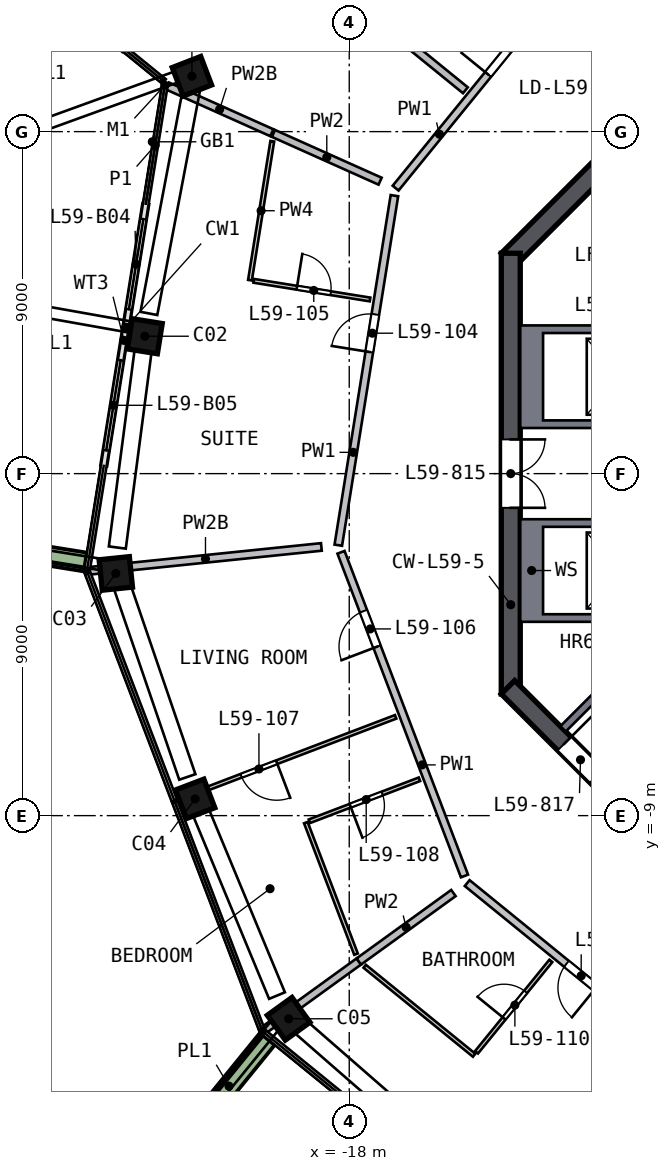
"""IFC4 building model, lengths in metres.
Left out: names, types, materials, properties, quantities, classifications, styles, units other than length and angle.
Written with IfcOpenShell. Run it as: python <this file> out.ifc"""

import sys

from ifc_helpers import new_model, si_unit, direction, frame, frame_2d, origin, origin_2d, place, context, subcontext, project, spatial, polyline, rectangle, outline, extrude, element, fill, save


model = new_model("IFC4")
c1 = context("Model", 3, precision=1e-05, world=origin(), true_north=direction((0.0, 1.0)))
c2 = subcontext(c1, "Body", "Model", "MODEL_VIEW")
j1 = project(units=[si_unit("LENGTHUNIT", "METRE"), si_unit("PLANEANGLEUNIT", "RADIAN")], contexts=[c1])
p1 = place(None, origin())
s1 = spatial("IfcSite", under=j1, at=p1, CompositionType="ELEMENT")
p2 = place(p1, origin())
s2 = spatial("IfcBuilding", under=s1, at=p2, CompositionType="ELEMENT")
p3 = place(p2, frame((0.0, 0.0, 241.0)))
s3 = spatial("IfcBuildingStorey", under=s2, at=p3, CompositionType="ELEMENT", Elevation=241.0)
p4 = place(p3, frame((-22.08, 10.584, 0.0), z_axis=(-0.0494849, -0.105430961, 0.993194622), x_axis=(-0.361383921, 0.928926692, 0.080603122)))
e1 = element("IfcColumn", 1, at=p4, inside=s3, PredefinedType="COLUMN", context=c2, shape_type="SweptSolid", body=[
    extrude(rectangle(XDim=0.8, YDim=0.8, at=origin_2d()), origin(), (0.0, 0.0, 1.0), 3.212),
])
p5 = place(p3, frame((-23.359, 3.75, 0.0), z_axis=(-0.016882596, -0.111333877, 0.993639646), x_axis=(-0.157302824, -0.981109815, -0.112602632)))
e2 = element("IfcColumn", 2, at=p5, inside=s3, PredefinedType="COLUMN", context=c2, shape_type="SweptSolid", body=[
    extrude(rectangle(XDim=0.8, YDim=0.8, at=origin_2d()), origin(), (0.0, 0.0, 1.0), 3.21),
])
p6 = place(p3, frame((-24.158, -2.488, 0.0), z_axis=(0.012847755, -0.114793547, 0.993306285), x_axis=(-0.10209663, 0.988045851, 0.115506166)))
e3 = element("IfcColumn", 3, at=p6, inside=s3, PredefinedType="COLUMN", context=c2, shape_type="SweptSolid", body=[
    extrude(rectangle(XDim=0.8, YDim=0.8, at=origin_2d()), origin(), (0.0, 0.0, 1.0), 3.211),
])
p7 = place(p3, frame((-22.105, -8.432, 0.0), z_axis=(0.040990103, -0.104794735, 0.993648768), x_axis=(0.354093219, -0.928416268, -0.112522108)))
e4 = element("IfcColumn", 4, at=p7, inside=s3, PredefinedType="COLUMN", context=c2, shape_type="SweptSolid", body=[
    extrude(rectangle(XDim=0.8, YDim=0.8, at=origin_2d()), origin(), (0.0, 0.0, 1.0), 3.21),
])
p8 = place(p3, frame((-19.677, -14.234, 0.0), z_axis=(0.068496241, -0.092975475, 0.993309532), x_axis=(-0.582352668, 0.804692577, 0.115478247)))
e5 = element("IfcColumn", 5, at=p8, inside=s3, PredefinedType="COLUMN", context=c2, shape_type="SweptSolid", body=[
    extrude(rectangle(XDim=0.8, YDim=0.8, at=origin_2d()), origin(), (0.0, 0.0, 1.0), 3.211),
])
p9 = place(p3, frame((-5.622, 13.823, 0.0), z_axis=(0.0, 0.0, 1.0), x_axis=(-0.707106781, -0.707106781, 0.0)))
e6 = element("IfcWall", 6, at=p9, inside=s3, PredefinedType="SHEAR", context=c2, shape_type="SweptSolid", body=[
    extrude(rectangle(XDim=11.598, YDim=0.5, at=frame_2d((5.799, 0.0))), origin(), (0.0, 0.0, 1.0), 3.5),
])
p10 = place(p3, frame((-13.75, 5.799, 0.0), z_axis=(0.0, 0.0, 1.0), x_axis=(0.0, -1.0, 0.0)))
e7 = element("IfcWall", 7, at=p10, inside=s3, PredefinedType="SHEAR", context=c2, shape_type="SweptSolid", body=[
    extrude(rectangle(XDim=11.598, YDim=0.5, at=frame_2d((5.799, 0.0))), origin(), (0.0, 0.0, 1.0), 3.5),
])
p11 = place(p10, frame((4.899, 0.0, 0.0)))
e8 = element("IfcOpeningElement", 8, at=p11, cuts=e7, PredefinedType="OPENING", context=c2, shape_type="SweptSolid", body=[
    extrude(rectangle(XDim=1.8, YDim=2.1, at=frame_2d((0.9, 1.05))), frame((0.0, 0.26, 0.0), z_axis=(0.0, -1.0, 0.0), x_axis=(1.0, 0.0, 0.0)), (0.0, 0.0, 1.0), 0.52),
])
p12 = place(p3, frame((-13.823, -5.622, 0.0), z_axis=(0.0, 0.0, 1.0), x_axis=(0.707106781, -0.707106781, 0.0)))
e9 = element("IfcWall", 9, at=p12, inside=s3, PredefinedType="SHEAR", context=c2, shape_type="SweptSolid", body=[
    extrude(rectangle(XDim=11.598, YDim=0.5, at=frame_2d((5.799, 0.0))), origin(), (0.0, 0.0, 1.0), 3.5),
])
p13 = place(p12, frame((2.099, 0.0, 0.0)))
e10 = element("IfcOpeningElement", 10, at=p13, cuts=e9, PredefinedType="OPENING", context=c2, shape_type="SweptSolid", body=[
    extrude(rectangle(XDim=1.2, YDim=2.1, at=frame_2d((0.6, 1.05))), frame((0.0, 0.26, 0.0), z_axis=(0.0, -1.0, 0.0), x_axis=(1.0, 0.0, 0.0)), (0.0, 0.0, 1.0), 0.52),
])
p14 = place(p3, frame((-23.354, 7.091, 0.0), z_axis=(0.0, 0.0, 1.0), x_axis=(-0.158541584, -0.987352301, 0.0)))
e11 = element("IfcWall", 11, at=p14, inside=s3, PredefinedType="SOLIDWALL", context=c2, shape_type="SweptSolid", body=[
    extrude(rectangle(XDim=3.3, YDim=0.15, at=frame_2d((1.65, 0.0))), origin(), (0.0, 0.0, 1.0), 2.525),
])
p15 = place(p14, frame((0.4, 0.0, 0.0)))
e12 = element("IfcOpeningElement", 12, at=p15, cuts=e11, PredefinedType="OPENING", context=c2, shape_type="SweptSolid", body=[
    extrude(rectangle(XDim=2.4, YDim=2.4, at=frame_2d((1.2, 1.2))), frame((0.0, 0.085, 0.0), z_axis=(0.0, -1.0, 0.0), x_axis=(1.0, 0.0, 0.0)), (0.0, 0.0, 1.0), 0.17),
])
p16 = place(p3, frame((-23.878, 3.833, 0.0), z_axis=(0.0, 0.0, 1.0), x_axis=(-0.158502817, -0.987358525, 0.0)))
e13 = element("IfcWall", 13, at=p16, inside=s3, PredefinedType="SOLIDWALL", context=c2, shape_type="SweptSolid", body=[
    extrude(rectangle(XDim=3.661, YDim=0.15, at=frame_2d((1.831, 0.0))), origin(), (0.0, 0.0, 1.0), 2.525),
])
p17 = place(p16, frame((0.861, 0.0, 0.0)))
e14 = element("IfcOpeningElement", 14, at=p17, cuts=e13, PredefinedType="OPENING", context=c2, shape_type="SweptSolid", body=[
    extrude(rectangle(XDim=2.4, YDim=2.4, at=frame_2d((1.2, 1.2))), frame((0.0, 0.085, 0.0), z_axis=(0.0, -1.0, 0.0), x_axis=(1.0, 0.0, 0.0)), (0.0, 0.0, 1.0), 0.17),
])
p18 = place(p3, frame((-25.732, 12.548, 0.0), z_axis=(0.0, 0.0, 1.0), x_axis=(-0.630920107, -0.775847806, 0.0)))
e15 = element("IfcWall", 15, at=p18, inside=s3, PredefinedType="SOLIDWALL", context=c2, shape_type="SweptSolid", body=[
    extrude(rectangle(XDim=3.199, YDim=0.5, at=frame_2d((1.6, 0.0))), origin(), (0.0, 0.0, 1.0), 0.7),
])
p19 = place(p3, frame((-27.608, -1.898, 0.0), z_axis=(0.0, 0.0, 1.0), x_axis=(0.987347321, -0.158572593, 0.0)))
e16 = element("IfcWall", 16, at=p19, inside=s3, PredefinedType="SOLIDWALL", context=c2, shape_type="SweptSolid", body=[
    extrude(rectangle(XDim=2.699, YDim=0.5, at=frame_2d((1.35, 0.0))), origin(), (0.0, 0.0, 1.0), 0.7),
])
p20 = place(p3, frame((-20.155, -14.878, 0.0), z_axis=(0.0, 0.0, 1.0), x_axis=(-0.630957466, -0.775817424, 0.0)))
e17 = element("IfcWall", 17, at=p20, inside=s3, PredefinedType="SOLIDWALL", context=c2, shape_type="SweptSolid", body=[
    extrude(rectangle(XDim=3.199, YDim=0.5, at=frame_2d((1.599, 0.0))), origin(), (0.0, 0.0, 1.0), 0.7),
])
p21 = place(p3, origin())
e18 = element("IfcWall", 18, at=p21, inside=s3, PredefinedType="SOLIDWALL", context=c2, shape_type="SweptSolid", body=[
    extrude(outline(polyline([(-13.5, 3.9), (-9.9, 3.9), (-9.9, 3.7), (-12.9, 3.7), (-12.9, 1.4), (-9.9, 1.4), (-9.9, 1.2), (-13.5, 1.2), (-13.5, 3.9)])), origin(), (0.0, 0.0, 1.0), 3.19),
])
p22 = place(p3, origin())
e19 = element("IfcWall", 19, at=p22, inside=s3, PredefinedType="SOLIDWALL", context=c2, shape_type="SweptSolid", body=[
    extrude(outline(polyline([(-13.5, -3.9), (-13.5, -1.2), (-9.9, -1.2), (-9.9, -1.4), (-12.9, -1.4), (-12.9, -3.7), (-9.9, -3.7), (-9.9, -3.9), (-13.5, -3.9)])), origin(), (0.0, 0.0, 1.0), 3.19),
])
p23 = place(p3, frame((-9.334, -3.677, 0.0), z_axis=(0.0, 0.0, 1.0), x_axis=(-0.707135168, -0.707078393, 0.0)))
e20 = element("IfcWall", 20, at=p23, inside=s3, PredefinedType="SOLIDWALL", context=c2, shape_type="SweptSolid", body=[
    extrude(rectangle(XDim=4.3, YDim=0.2, at=frame_2d((2.15, 0.0))), origin(), (0.0, 0.0, 1.0), 3.19),
])
p24 = place(p3, frame((-18.288, -1.883, 0.0), z_axis=(0.0, 0.0, 1.0), x_axis=(0.158514786, 0.987356604, 0.0)))
e21 = element("IfcWall", 21, at=p24, inside=s3, PredefinedType="SOLIDWALL", context=c2, shape_type="SweptSolid", body=[
    extrude(rectangle(XDim=9.316, YDim=0.2, at=frame_2d((4.658, 0.0))), origin(), (0.0, 0.0, 1.0), 3.19),
])
p25 = place(p24, frame((5.15, 0.0, 0.0)))
e22 = element("IfcOpeningElement", 22, at=p25, cuts=e21, PredefinedType="OPENING", context=c2, shape_type="SweptSolid", body=[
    extrude(rectangle(XDim=1.0, YDim=2.1, at=frame_2d((0.5, 1.05))), frame((0.0, 0.11, 0.0), z_axis=(0.0, -1.0, 0.0), x_axis=(1.0, 0.0, 0.0)), (0.0, 0.0, 1.0), 0.22),
])
p26 = place(p3, frame((-14.968, -10.588, 0.0), z_axis=(0.0, 0.0, 1.0), x_axis=(-0.35640621, 0.934331105, 0.0)))
e23 = element("IfcWall", 23, at=p26, inside=s3, PredefinedType="SOLIDWALL", context=c2, shape_type="SweptSolid", body=[
    extrude(rectangle(XDim=9.117, YDim=0.2, at=frame_2d((4.558, 0.0))), origin(), (0.0, 0.0, 1.0), 3.19),
])
p27 = place(p26, frame((6.458, 0.0, 0.0)))
e24 = element("IfcOpeningElement", 24, at=p27, cuts=e23, PredefinedType="OPENING", context=c2, shape_type="SweptSolid", body=[
    extrude(rectangle(XDim=1.0, YDim=2.1, at=frame_2d((0.5, 1.05))), frame((0.0, 0.11, 0.0), z_axis=(0.0, -1.0, 0.0), x_axis=(1.0, 0.0, 0.0)), (0.0, 0.0, 1.0), 0.22),
])
p28 = place(p3, frame((-16.78, 7.513, 0.0), z_axis=(0.0, 0.0, 1.0), x_axis=(0.630941799, 0.775830166, 0.0)))
e25 = element("IfcWall", 25, at=p28, inside=s3, PredefinedType="SOLIDWALL", context=c2, shape_type="SweptSolid", body=[
    extrude(rectangle(XDim=9.316, YDim=0.2, at=frame_2d((4.658, 0.0))), origin(), (0.0, 0.0, 1.0), 3.19),
])
p29 = place(p28, frame((3.856, 0.0, 0.0)))
e26 = element("IfcOpeningElement", 26, at=p29, cuts=e25, PredefinedType="OPENING", context=c2, shape_type="SweptSolid", body=[
    extrude(rectangle(XDim=1.8, YDim=2.1, at=frame_2d((0.9, 1.05))), frame((0.0, 0.11, 0.0), z_axis=(0.0, -1.0, 0.0), x_axis=(1.0, 0.0, 0.0)), (0.0, 0.0, 1.0), 0.22),
])
p30 = place(p3, frame((-7.513, -16.78, 0.0), z_axis=(0.0, 0.0, 1.0), x_axis=(-0.775832995, 0.63093832, 0.0)))
e27 = element("IfcWall", 27, at=p30, inside=s3, PredefinedType="SOLIDWALL", context=c2, shape_type="SweptSolid", body=[
    extrude(rectangle(XDim=9.517, YDim=0.2, at=frame_2d((4.758, 0.0))), origin(), (0.0, 0.0, 1.0), 3.19),
])
p31 = place(p30, frame((5.15, 0.0, 0.0)))
e28 = element("IfcOpeningElement", 28, at=p31, cuts=e27, PredefinedType="OPENING", context=c2, shape_type="SweptSolid", body=[
    extrude(rectangle(XDim=1.0, YDim=2.1, at=frame_2d((0.5, 1.05))), frame((0.0, 0.11, 0.0), z_axis=(0.0, -1.0, 0.0), x_axis=(1.0, 0.0, 0.0)), (0.0, 0.0, 1.0), 0.22),
])
p32 = place(p3, frame((-18.733, -1.929, 0.0), z_axis=(0.0, 0.0, 1.0), x_axis=(-0.994739183, -0.102440021, 0.0)))
e29 = element("IfcWall", 29, at=p32, inside=s3, PredefinedType="SOLIDWALL", context=c2, shape_type="SweptSolid", body=[
    extrude(rectangle(XDim=6.132, YDim=0.2, at=frame_2d((3.066, 0.0))), origin(), (0.0, 0.0, 1.0), 2.69),
])
p33 = place(p3, frame((-20.036, 8.971, 0.0), z_axis=(0.0, 0.0, 1.0), x_axis=(-0.912711653, 0.408604257, 0.0)))
e30 = element("IfcWall", 30, at=p33, inside=s3, PredefinedType="SOLIDWALL", context=c2, shape_type="SweptSolid", body=[
    extrude(rectangle(XDim=3.011, YDim=0.2, at=frame_2d((1.506, 0.0))), origin(), (0.0, 0.0, 1.0), 2.69),
])
p34 = place(p3, frame((-14.943, 10.088, 0.0), z_axis=(0.0, 0.0, 1.0), x_axis=(-0.775818437, 0.630956222, 0.0)))
e31 = element("IfcWall", 31, at=p34, inside=s3, PredefinedType="SOLIDWALL", context=c2, shape_type="SweptSolid", body=[
    extrude(rectangle(XDim=13.623, YDim=0.2, at=frame_2d((6.811, 0.0))), origin(), (0.0, 0.0, 1.0), 3.19),
])
p35 = place(p34, frame((4.2, 0.0, 0.0)))
e32 = element("IfcOpeningElement", 32, at=p35, cuts=e31, PredefinedType="OPENING", context=c2, shape_type="SweptSolid", body=[
    extrude(rectangle(XDim=1.0, YDim=2.1, at=frame_2d((0.5, 1.05))), frame((0.0, 0.11, 0.0), z_axis=(0.0, -1.0, 0.0), x_axis=(1.0, 0.0, 0.0)), (0.0, 0.0, 1.0), 0.22),
])
p36 = place(p3, frame((-17.748, -12.838, 0.0), z_axis=(0.0, 0.0, 1.0), x_axis=(-0.810251826, -0.586081888, 0.0)))
e33 = element("IfcWall", 33, at=p36, inside=s3, PredefinedType="SOLIDWALL", context=c2, shape_type="SweptSolid", body=[
    extrude(rectangle(XDim=3.059, YDim=0.2, at=frame_2d((1.53, 0.0))), origin(), (0.0, 0.0, 1.0), 3.19),
])
p37 = place(p3, frame((-17.188, 7.696, 0.0), z_axis=(0.0, 0.0, 1.0), x_axis=(-0.91271463, 0.408597606, 0.0)))
e34 = element("IfcWall", 34, at=p37, inside=s3, PredefinedType="SOLIDWALL", context=c2, shape_type="SweptSolid", body=[
    extrude(rectangle(XDim=3.075, YDim=0.2, at=frame_2d((1.537, 0.0))), origin(), (0.0, 0.0, 1.0), 3.19),
])
p38 = place(p3, frame((-15.259, -11.037, 0.0), z_axis=(0.0, 0.0, 1.0), x_axis=(-0.810234847, -0.58610536, 0.0)))
e35 = element("IfcWall", 35, at=p38, inside=s3, PredefinedType="SOLIDWALL", context=c2, shape_type="SweptSolid", body=[
    extrude(rectangle(XDim=3.073, YDim=0.2, at=frame_2d((1.536, 0.0))), origin(), (0.0, 0.0, 1.0), 3.19),
])
p39 = place(p3, frame((-20.612, 5.09, 0.0), z_axis=(0.0, 0.0, 1.0), x_axis=(0.15852778, 0.987354517, 0.0)))
e36 = element("IfcWall", 36, at=p39, inside=s3, PredefinedType="PARTITIONING", context=c2, shape_type="SweptSolid", body=[
    extrude(rectangle(XDim=3.704, YDim=0.1, at=frame_2d((1.852, 0.0))), origin(), (0.0, 0.0, 1.0), 3.19),
])
p40 = place(p3, frame((-16.779, -6.401, 0.0), z_axis=(0.0, 0.0, 1.0), x_axis=(-0.934330424, -0.356407994, 0.0)))
e37 = element("IfcWall", 37, at=p40, inside=s3, PredefinedType="PARTITIONING", context=c2, shape_type="SweptSolid", body=[
    extrude(rectangle(XDim=6.15, YDim=0.1, at=frame_2d((3.075, 0.0))), origin(), (0.0, 0.0, 1.0), 3.19),
])
p41 = place(p40, frame((3.35, 0.0, 0.0)))
e38 = element("IfcOpeningElement", 38, at=p41, cuts=e37, PredefinedType="OPENING", context=c2, shape_type="SweptSolid", body=[
    extrude(rectangle(XDim=1.0, YDim=2.1, at=frame_2d((0.5, 1.05))), frame((0.0, 0.06, 0.0), z_axis=(0.0, -1.0, 0.0), x_axis=(1.0, 0.0, 0.0)), (0.0, 0.0, 1.0), 0.12),
])
p42 = place(p3, frame((-20.513, 5.074, 0.0), z_axis=(0.0, 0.0, 1.0), x_axis=(0.987353495, -0.158534146, 0.0)))
e39 = element("IfcWall", 39, at=p42, inside=s3, PredefinedType="PARTITIONING", context=c2, shape_type="SweptSolid", body=[
    extrude(rectangle(XDim=3.1, YDim=0.1, at=frame_2d((1.55, 0.0))), origin(), (0.0, 0.0, 1.0), 3.19),
])
p43 = place(p42, frame((1.15, 0.0, 0.0)))
e40 = element("IfcOpeningElement", 40, at=p43, cuts=e39, PredefinedType="OPENING", context=c2, shape_type="SweptSolid", body=[
    extrude(rectangle(XDim=0.9, YDim=2.1, at=frame_2d((0.45, 1.05))), frame((0.0, 0.06, 0.0), z_axis=(0.0, -1.0, 0.0), x_axis=(1.0, 0.0, 0.0)), (0.0, 0.0, 1.0), 0.12),
])
p44 = place(p3, frame((-19.142, -9.184, 0.0), z_axis=(0.0, 0.0, 1.0), x_axis=(0.356376272, -0.934342524, 0.0)))
e41 = element("IfcWall", 41, at=p44, inside=s3, PredefinedType="PARTITIONING", context=c2, shape_type="SweptSolid", body=[
    extrude(rectangle(XDim=3.704, YDim=0.1, at=frame_2d((1.852, 0.0))), origin(), (0.0, 0.0, 1.0), 3.19),
])
p45 = place(p3, frame((-16.152, -8.043, 0.0), z_axis=(0.0, 0.0, 1.0), x_axis=(-0.93433668, -0.356391594, 0.0)))
e42 = element("IfcWall", 42, at=p45, inside=s3, PredefinedType="PARTITIONING", context=c2, shape_type="SweptSolid", body=[
    extrude(rectangle(XDim=3.1, YDim=0.1, at=frame_2d((1.55, 0.0))), origin(), (0.0, 0.0, 1.0), 3.19),
])
p46 = place(p45, frame((1.05, 0.0, 0.0)))
e43 = element("IfcOpeningElement", 43, at=p46, cuts=e42, PredefinedType="OPENING", context=c2, shape_type="SweptSolid", body=[
    extrude(rectangle(XDim=0.9, YDim=2.1, at=frame_2d((0.45, 1.05))), frame((0.0, 0.06, 0.0), z_axis=(0.0, -1.0, 0.0), x_axis=(1.0, 0.0, 0.0)), (0.0, 0.0, 1.0), 0.12),
])
p47 = place(p3, frame((-14.714, -15.306, 0.0), z_axis=(0.0, 0.0, 1.0), x_axis=(-0.775818108, 0.630956625, 0.0)))
e44 = element("IfcWall", 44, at=p47, inside=s3, PredefinedType="PARTITIONING", context=c2, shape_type="SweptSolid", body=[
    extrude(rectangle(XDim=3.711, YDim=0.1, at=frame_2d((1.855, 0.0))), origin(), (0.0, 0.0, 1.0), 3.19),
])
p48 = place(p3, frame((-14.651, -15.228, 0.0), z_axis=(0.0, 0.0, 1.0), x_axis=(0.630936464, 0.775834504, 0.0)))
e45 = element("IfcWall", 45, at=p48, inside=s3, PredefinedType="PARTITIONING", context=c2, shape_type="SweptSolid", body=[
    extrude(rectangle(XDim=3.1, YDim=0.1, at=frame_2d((1.55, 0.0))), origin(), (0.0, 0.0, 1.0), 3.19),
])
p49 = place(p48, frame((1.15, 0.0, 0.0)))
e46 = element("IfcOpeningElement", 46, at=p49, cuts=e45, PredefinedType="OPENING", context=c2, shape_type="SweptSolid", body=[
    extrude(rectangle(XDim=0.9, YDim=2.1, at=frame_2d((0.45, 1.05))), frame((0.0, 0.06, 0.0), z_axis=(0.0, -1.0, 0.0), x_axis=(1.0, 0.0, 0.0)), (0.0, 0.0, 1.0), 0.12),
])
p50 = place(p15, origin())
e47 = element("IfcDoor", 47, at=p50, inside=s3, OperationType="SLIDING_TO_RIGHT", PredefinedType="DOOR", context=c2, shape_type="SweptSolid", body=[
    extrude(rectangle(XDim=2.4, YDim=2.4, at=frame_2d((1.2, 1.2))), frame((0.0, 0.025, 0.0), z_axis=(0.0, -1.0, 0.0), x_axis=(1.0, 0.0, 0.0)), (0.0, 0.0, 1.0), 0.05),
])
fill(e12, e47)
p51 = place(p17, origin())
e48 = element("IfcDoor", 48, at=p51, inside=s3, OperationType="SLIDING_TO_LEFT", PredefinedType="DOOR", context=c2, shape_type="SweptSolid", body=[
    extrude(rectangle(XDim=2.4, YDim=2.4, at=frame_2d((1.2, 1.2))), frame((0.0, 0.025, 0.0), z_axis=(0.0, -1.0, 0.0), x_axis=(1.0, 0.0, 0.0)), (0.0, 0.0, 1.0), 0.05),
])
fill(e14, e48)
p52 = place(p11, origin())
e49 = element("IfcDoor", 49, at=p52, inside=s3, OperationType="DOUBLE_DOOR_SINGLE_SWING", PredefinedType="DOOR", context=c2, shape_type="SweptSolid", body=[
    extrude(rectangle(XDim=1.8, YDim=2.1, at=frame_2d((0.9, 1.05))), frame((0.0, 0.025, 0.0), z_axis=(0.0, -1.0, 0.0), x_axis=(1.0, 0.0, 0.0)), (0.0, 0.0, 1.0), 0.05),
])
fill(e8, e49)
p53 = place(p13, origin())
e50 = element("IfcDoor", 50, at=p53, inside=s3, OperationType="SINGLE_SWING_LEFT", PredefinedType="DOOR", context=c2, shape_type="SweptSolid", body=[
    extrude(rectangle(XDim=1.2, YDim=2.1, at=frame_2d((0.6, 1.05))), frame((0.0, 0.025, 0.0), z_axis=(0.0, -1.0, 0.0), x_axis=(1.0, 0.0, 0.0)), (0.0, 0.0, 1.0), 0.05),
])
fill(e10, e50)
p54 = place(p29, origin())
e51 = element("IfcDoor", 51, at=p54, inside=s3, OperationType="DOUBLE_DOOR_SINGLE_SWING", PredefinedType="DOOR", context=c2, shape_type="SweptSolid", body=[
    extrude(rectangle(XDim=1.8, YDim=2.1, at=frame_2d((0.9, 1.05))), frame((0.0, 0.025, 0.0), z_axis=(0.0, -1.0, 0.0), x_axis=(1.0, 0.0, 0.0)), (0.0, 0.0, 1.0), 0.05),
])
fill(e26, e51)
p55 = place(p25, origin())
e52 = element("IfcDoor", 52, at=p55, inside=s3, OperationType="SINGLE_SWING_LEFT", PredefinedType="DOOR", context=c2, shape_type="SweptSolid", body=[
    extrude(rectangle(XDim=1.0, YDim=2.1, at=frame_2d((0.5, 1.05))), frame((0.0, 0.025, 0.0), z_axis=(0.0, -1.0, 0.0), x_axis=(1.0, 0.0, 0.0)), (0.0, 0.0, 1.0), 0.05),
])
fill(e22, e52)
p56 = place(p43, origin())
e53 = element("IfcDoor", 53, at=p56, inside=s3, OperationType="SINGLE_SWING_LEFT", PredefinedType="DOOR", context=c2, shape_type="SweptSolid", body=[
    extrude(rectangle(XDim=0.9, YDim=2.1, at=frame_2d((0.45, 1.05))), frame((0.0, 0.025, 0.0), z_axis=(0.0, -1.0, 0.0), x_axis=(1.0, 0.0, 0.0)), (0.0, 0.0, 1.0), 0.05),
])
fill(e40, e53)
p57 = place(p27, origin())
e54 = element("IfcDoor", 54, at=p57, inside=s3, OperationType="SINGLE_SWING_LEFT", PredefinedType="DOOR", context=c2, shape_type="SweptSolid", body=[
    extrude(rectangle(XDim=1.0, YDim=2.1, at=frame_2d((0.5, 1.05))), frame((0.0, 0.025, 0.0), z_axis=(0.0, -1.0, 0.0), x_axis=(1.0, 0.0, 0.0)), (0.0, 0.0, 1.0), 0.05),
])
fill(e24, e54)
p58 = place(p41, origin())
e55 = element("IfcDoor", 55, at=p58, inside=s3, OperationType="SINGLE_SWING_LEFT", PredefinedType="DOOR", context=c2, shape_type="SweptSolid", body=[
    extrude(rectangle(XDim=1.0, YDim=2.1, at=frame_2d((0.5, 1.05))), frame((0.0, 0.025, 0.0), z_axis=(0.0, -1.0, 0.0), x_axis=(1.0, 0.0, 0.0)), (0.0, 0.0, 1.0), 0.05),
])
fill(e38, e55)
p59 = place(p46, origin())
e56 = element("IfcDoor", 56, at=p59, inside=s3, OperationType="SINGLE_SWING_RIGHT", PredefinedType="DOOR", context=c2, shape_type="SweptSolid", body=[
    extrude(rectangle(XDim=0.9, YDim=2.1, at=frame_2d((0.45, 1.05))), frame((0.0, 0.025, 0.0), z_axis=(0.0, -1.0, 0.0), x_axis=(1.0, 0.0, 0.0)), (0.0, 0.0, 1.0), 0.05),
])
fill(e43, e56)
p60 = place(p31, origin())
e57 = element("IfcDoor", 57, at=p60, inside=s3, OperationType="SINGLE_SWING_LEFT", PredefinedType="DOOR", context=c2, shape_type="SweptSolid", body=[
    extrude(rectangle(XDim=1.0, YDim=2.1, at=frame_2d((0.5, 1.05))), frame((0.0, 0.025, 0.0), z_axis=(0.0, -1.0, 0.0), x_axis=(1.0, 0.0, 0.0)), (0.0, 0.0, 1.0), 0.05),
])
fill(e28, e57)
p61 = place(p49, origin())
e58 = element("IfcDoor", 58, at=p61, inside=s3, OperationType="SINGLE_SWING_LEFT", PredefinedType="DOOR", context=c2, shape_type="SweptSolid", body=[
    extrude(rectangle(XDim=0.9, YDim=2.1, at=frame_2d((0.45, 1.05))), frame((0.0, 0.025, 0.0), z_axis=(0.0, -1.0, 0.0), x_axis=(1.0, 0.0, 0.0)), (0.0, 0.0, 1.0), 0.05),
])
fill(e46, e58)
save(model, sys.argv[1])
